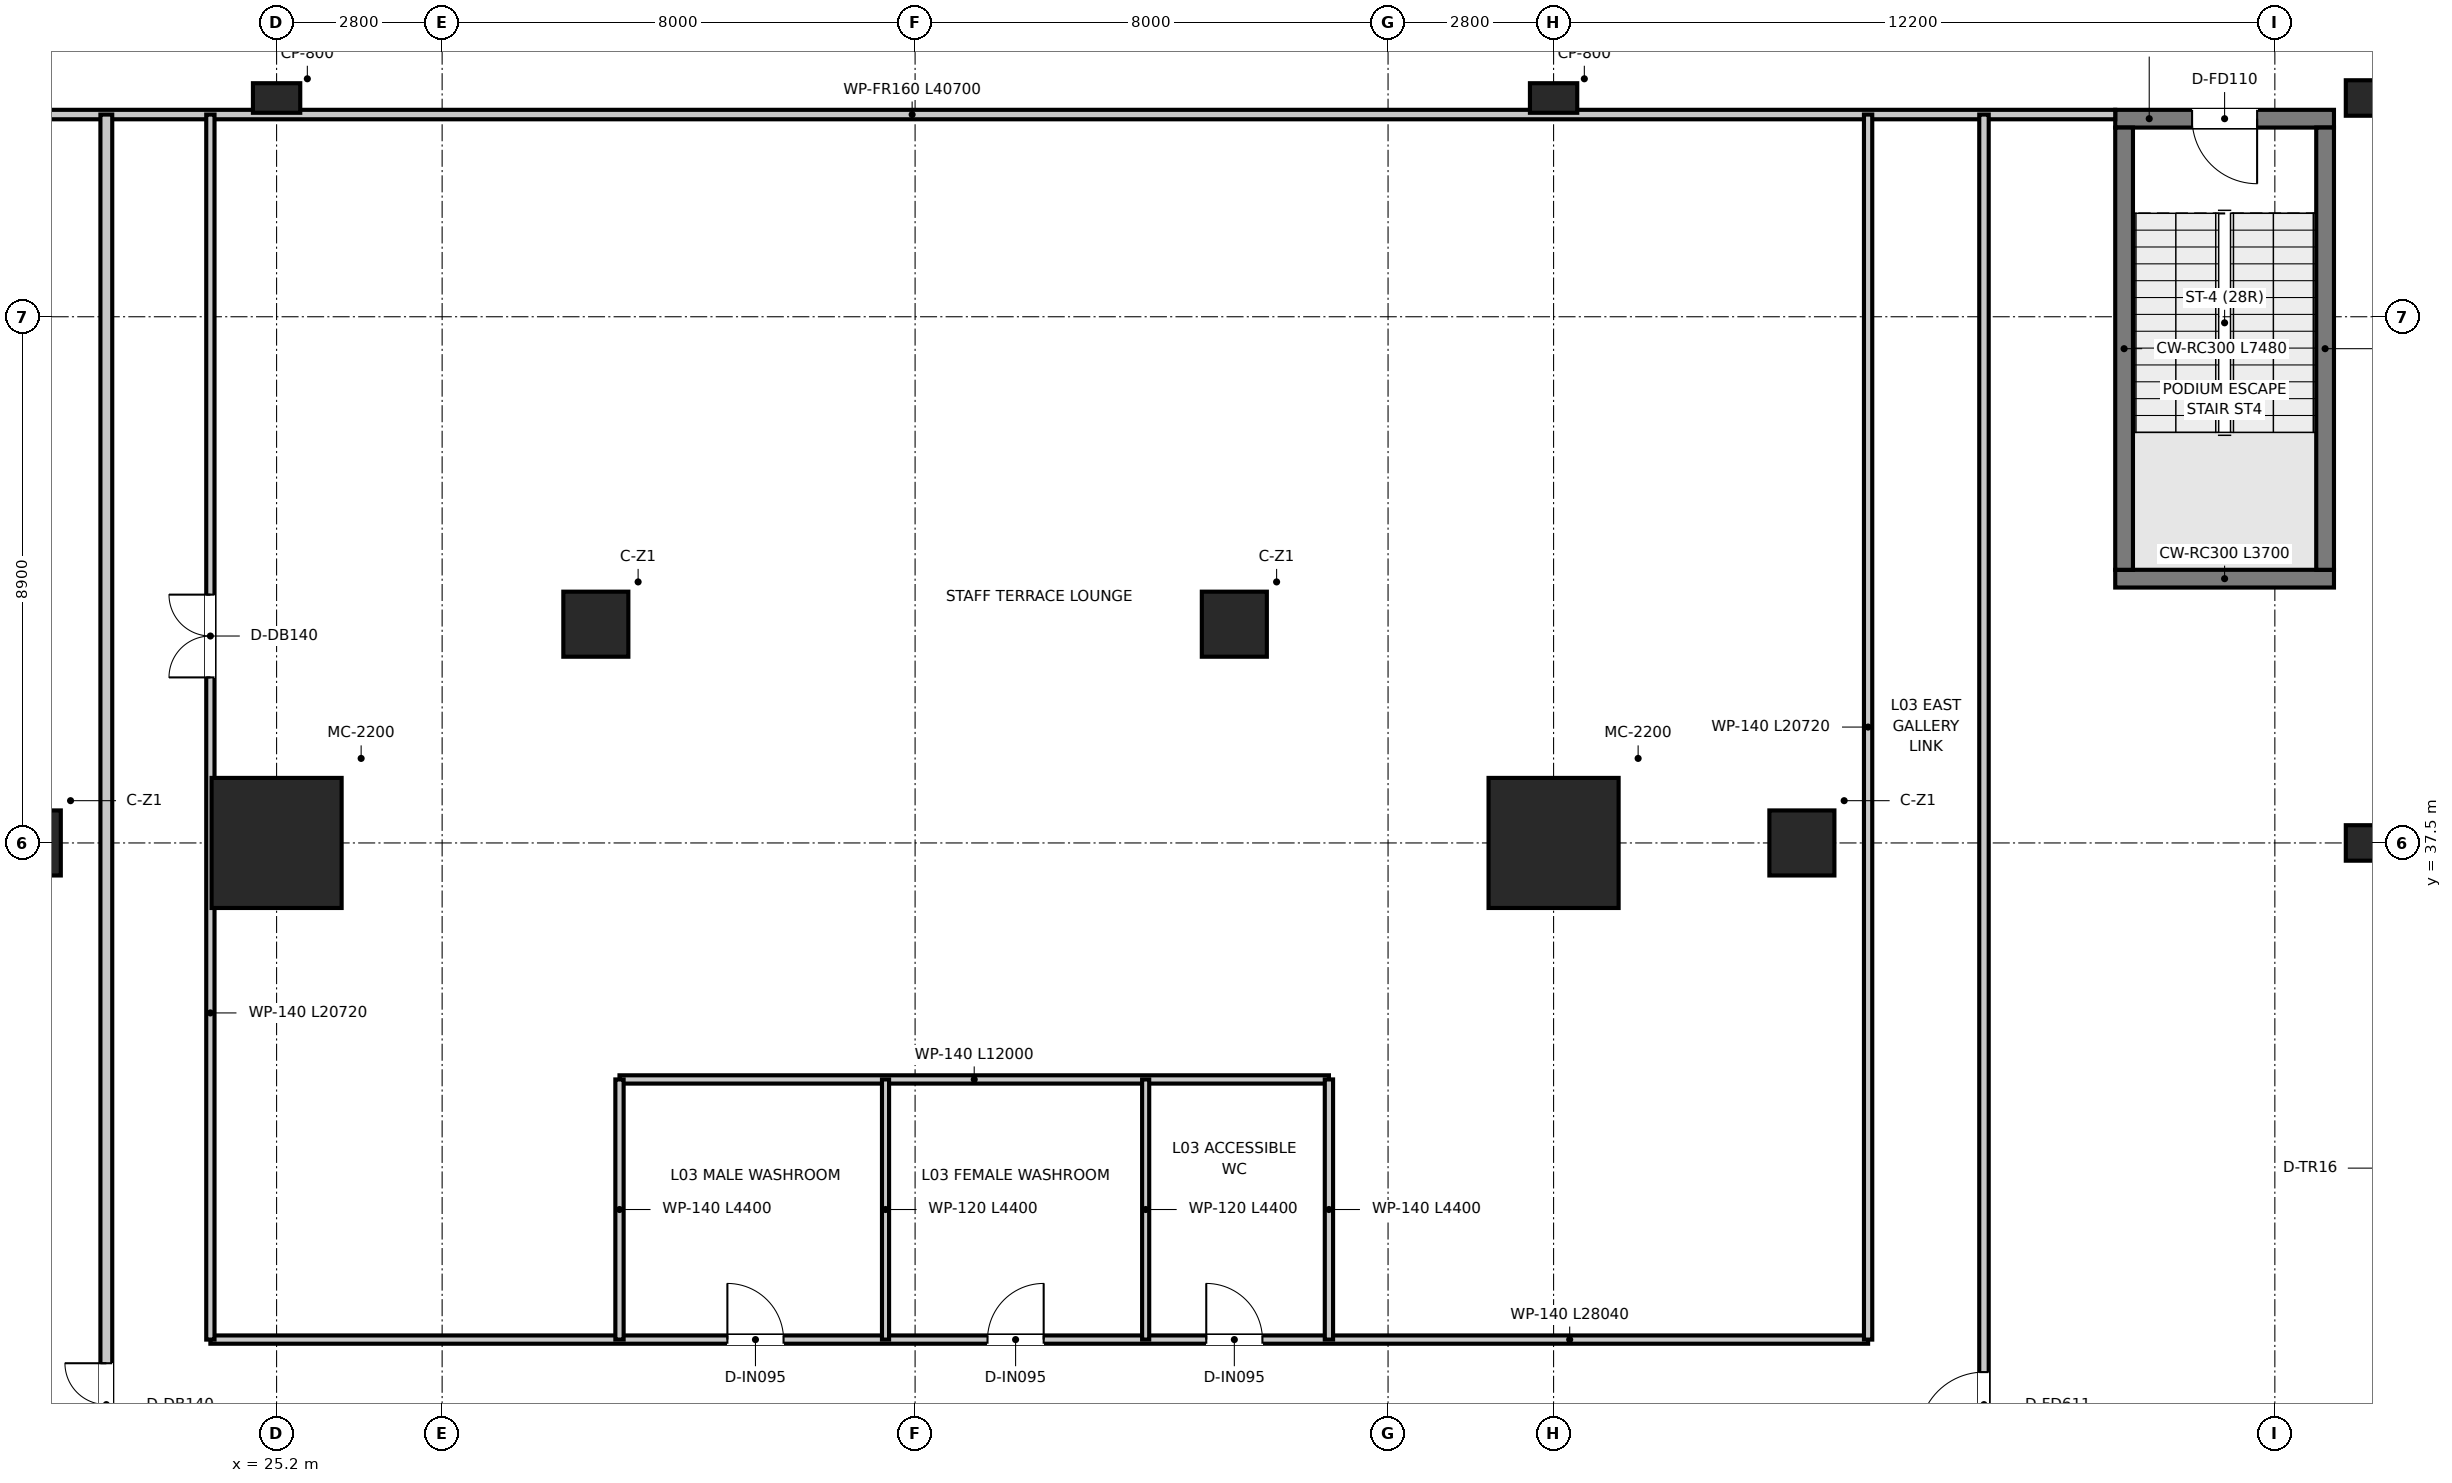
"""IFC4 building model, lengths in metres.
Left out: names, types, materials, properties, quantities, classifications, styles, units other than length and angle.
Written with IfcOpenShell. Run it as: python <this file> out.ifc"""

import sys

from ifc_helpers import new_model, si_unit, direction, frame, frame_2d, origin, origin_2d, place, context, subcontext, project, spatial, rectangle, extrude, source, transform, mapped, element, fill, save


model = new_model("IFC4")
c1 = context("Model", 3, precision=1e-05, world=origin(), true_north=direction((0.0, 1.0)))
c2 = subcontext(c1, "Body", "Model", "MODEL_VIEW")
j1 = project(units=[si_unit("LENGTHUNIT", "METRE"), si_unit("PLANEANGLEUNIT", "RADIAN")], contexts=[c1])
p1 = place(None, origin())
s1 = spatial("IfcSite", under=j1, at=p1, CompositionType="ELEMENT")
p2 = place(p1, origin())
s2 = spatial("IfcBuilding", under=s1, at=p2, CompositionType="ELEMENT")
p3 = place(p2, frame((0.0, 0.0, 15.4)))
s3 = spatial("IfcBuildingStorey", under=s2, at=p3, CompositionType="ELEMENT", Elevation=15.4)
p4 = place(p3, frame((56.3, 41.97, 0.0), z_axis=(0.0, 0.0, 1.0), x_axis=(1.0, 0.0, 0.0)))
e1 = element("IfcWall", 1, at=p4, inside=s3, PredefinedType="SHEAR", context=c2, shape_type="SweptSolid", body=[
    extrude(rectangle(XDim=3.7, YDim=0.3, at=frame_2d((1.85, 0.0))), origin(), (0.0, 0.0, 1.0), 4.6),
])
p5 = place(p3, frame((60.0, 49.75, 0.0), z_axis=(0.0, 0.0, 1.0), x_axis=(-1.0, 0.0, 0.0)))
e2 = element("IfcWall", 2, at=p5, inside=s3, PredefinedType="SHEAR", context=c2, shape_type="SweptSolid", body=[
    extrude(rectangle(XDim=3.7, YDim=0.3, at=frame_2d((1.85, 0.0))), origin(), (0.0, 0.0, 1.0), 4.6),
])
p6 = place(p5, frame((1.3, 0.0, 0.0)))
e3 = element("IfcOpeningElement", 3, at=p6, cuts=e2, PredefinedType="OPENING", context=c2, shape_type="SweptSolid", body=[
    extrude(rectangle(XDim=1.1, YDim=2.15, at=frame_2d((0.55, 1.075))), frame((0.0, 0.16, 0.0), z_axis=(0.0, -1.0, 0.0), x_axis=(1.0, 0.0, 0.0)), (0.0, 0.0, 1.0), 0.32),
])
for number, where, z_axis, x_axis in (
    (4, (56.45, 42.12, 0.0), (0.0, 0.0, 1.0), (0.0, 1.0, 0.0)),
    (5, (59.85, 42.12, 0.0), (0.0, 0.0, 1.0), (0.0, 1.0, 0.0)),
):
    element("IfcWall", number, at=place(p3, frame(where, z_axis=z_axis, x_axis=x_axis)), inside=s3, PredefinedType="SHEAR", context=c2, shape_type="SweptSolid", body=[
        extrude(rectangle(XDim=7.48, YDim=0.3, at=frame_2d((3.74, 0.0))), origin(), (0.0, 0.0, 1.0), 4.6),
    ])
m1 = source(origin(), c2, "Body", "SweptSolid", [
    extrude(rectangle(XDim=2.2, YDim=2.2, at=origin_2d()), origin(), (0.0, 0.0, 1.0), 4.6),
])
for number, where, z_axis, x_axis in (
    (6, (46.8, 37.5, 0.0), (0.0, 0.0, 1.0), (1.0, 0.0, 0.0)),
    (7, (25.2, 37.5, 0.0), (0.0, 0.0, 1.0), (1.0, 0.0, 0.0)),
):
    element("IfcColumn", number, at=place(p3, frame(where, z_axis=z_axis, x_axis=x_axis)), inside=s3, PredefinedType="USERDEFINED", context=c2, shape_type="MappedRepresentation", body=[
        mapped(m1, transform((0.0, 0.0, 0.0), x_axis=(1.0, 0.0, 0.0), y_axis=(0.0, 1.0, 0.0), z_axis=(0.0, 0.0, 1.0), scale=1.0)),
    ])
m2 = source(origin(), c2, "Body", "SweptSolid", [
    extrude(rectangle(XDim=1.1, YDim=1.1, at=origin_2d()), origin(), (0.0, 0.0, 1.0), 4.6),
])
for number, where, z_axis, x_axis in (
    (8, (21.0, 37.5, 0.0), (0.0, 0.0, 1.0), (1.0, 0.0, 0.0)),
    (9, (30.6, 41.2, 0.0), (0.0, 0.0, 1.0), (1.0, 0.0, 0.0)),
    (10, (41.4, 41.2, 0.0), (0.0, 0.0, 1.0), (1.0, 0.0, 0.0)),
    (11, (51.0, 37.5, 0.0), (0.0, 0.0, 1.0), (1.0, 0.0, 0.0)),
):
    element("IfcColumn", number, at=place(p3, frame(where, z_axis=z_axis, x_axis=x_axis)), inside=s3, PredefinedType="COLUMN", context=c2, shape_type="MappedRepresentation", body=[
        mapped(m2, transform((0.0, 0.0, 0.0), x_axis=(1.0, 0.0, 0.0), y_axis=(0.0, 1.0, 0.0), z_axis=(0.0, 0.0, 1.0), scale=1.0)),
    ])
m3 = source(origin(), c2, "Body", "SweptSolid", [
    extrude(rectangle(XDim=0.6, YDim=0.6, at=origin_2d()), origin(), (0.0, 0.0, 1.0), 4.6),
])
for number, where, z_axis, x_axis in (
    (12, (60.5, 37.5, 0.0), (0.0, 0.0, 1.0), (1.0, 0.0, 0.0)),
    (13, (60.5, 50.1, 0.0), (0.0, 0.0, 1.0), (1.0, 0.0, 0.0)),
):
    element("IfcColumn", number, at=place(p3, frame(where, z_axis=z_axis, x_axis=x_axis)), inside=s3, PredefinedType="COLUMN", context=c2, shape_type="MappedRepresentation", body=[
        mapped(m3, transform((0.0, 0.0, 0.0), x_axis=(1.0, 0.0, 0.0), y_axis=(0.0, 1.0, 0.0), z_axis=(0.0, 0.0, 1.0), scale=1.0)),
    ])
m4 = source(origin(), c2, "Body", "SweptSolid", [
    extrude(rectangle(XDim=0.8, YDim=0.5, at=origin_2d()), origin(), (0.0, 0.0, 1.0), 4.6),
])
for number, where, z_axis, x_axis in (
    (14, (25.2, 50.1, 0.0), (0.0, 0.0, 1.0), (1.0, 0.0, 0.0)),
    (15, (46.8, 50.1, 0.0), (0.0, 0.0, 1.0), (1.0, 0.0, 0.0)),
):
    element("IfcColumn", number, at=place(p3, frame(where, z_axis=z_axis, x_axis=x_axis)), inside=s3, PredefinedType="PILASTER", context=c2, shape_type="MappedRepresentation", body=[
        mapped(m4, transform((0.0, 0.0, 0.0), x_axis=(1.0, 0.0, 0.0), y_axis=(0.0, 1.0, 0.0), z_axis=(0.0, 0.0, 1.0), scale=1.0)),
    ])
p7 = place(p3, frame((24.08, 29.1, 0.0), z_axis=(0.0, 0.0, 1.0), x_axis=(1.0, 0.0, 0.0)))
e16 = element("IfcWall", 16, at=p7, inside=s3, PredefinedType="PARTITIONING", context=c2, shape_type="SweptSolid", body=[
    extrude(rectangle(XDim=28.04, YDim=0.14, at=frame_2d((14.02, 0.0))), origin(), (0.0, 0.0, 1.0), 3.45),
])
p8 = place(p7, frame((8.745, 0.0, 0.0)))
e17 = element("IfcOpeningElement", 17, at=p8, cuts=e16, PredefinedType="OPENING", context=c2, shape_type="SweptSolid", body=[
    extrude(rectangle(XDim=0.95, YDim=2.1, at=frame_2d((0.475, 1.05))), frame((0.0, 0.08, 0.0), z_axis=(0.0, -1.0, 0.0), x_axis=(1.0, 0.0, 0.0)), (0.0, 0.0, 1.0), 0.16),
])
p9 = place(p7, frame((13.145, 0.0, 0.0)))
e18 = element("IfcOpeningElement", 18, at=p9, cuts=e16, PredefinedType="OPENING", context=c2, shape_type="SweptSolid", body=[
    extrude(rectangle(XDim=0.95, YDim=2.1, at=frame_2d((0.475, 1.05))), frame((0.0, 0.08, 0.0), z_axis=(0.0, -1.0, 0.0), x_axis=(1.0, 0.0, 0.0)), (0.0, 0.0, 1.0), 0.16),
])
p10 = place(p7, frame((16.845, 0.0, 0.0)))
e19 = element("IfcOpeningElement", 19, at=p10, cuts=e16, PredefinedType="OPENING", context=c2, shape_type="SweptSolid", body=[
    extrude(rectangle(XDim=0.95, YDim=2.1, at=frame_2d((0.475, 1.05))), frame((0.0, 0.08, 0.0), z_axis=(0.0, -1.0, 0.0), x_axis=(1.0, 0.0, 0.0)), (0.0, 0.0, 1.0), 0.16),
])
p11 = place(p3, frame((15.6, 49.82, 0.0), z_axis=(0.0, 0.0, 1.0), x_axis=(1.0, 0.0, 0.0)))
e20 = element("IfcWall", 20, at=p11, inside=s3, PredefinedType="PARTITIONING", context=c2, shape_type="SweptSolid", body=[
    extrude(rectangle(XDim=40.7, YDim=0.16, at=frame_2d((20.35, 0.0))), origin(), (0.0, 0.0, 1.0), 3.56),
])
p12 = place(p3, frame((22.32, 0.605, 0.0), z_axis=(0.0, 0.0, 1.0), x_axis=(0.0, 1.0, 0.0)))
e21 = element("IfcWall", 21, at=p12, inside=s3, PredefinedType="PARTITIONING", context=c2, shape_type="SweptSolid", body=[
    extrude(rectangle(XDim=49.215, YDim=0.2, at=frame_2d((24.607, 0.0))), origin(), (0.0, 0.0, 1.0), 3.55),
])
p13 = place(p12, frame((26.695, 0.0, 0.0)))
e22 = element("IfcOpeningElement", 22, at=p13, cuts=e21, PredefinedType="OPENING", context=c2, shape_type="SweptSolid", body=[
    extrude(rectangle(XDim=1.4, YDim=2.2, at=frame_2d((0.7, 1.1))), frame((0.0, 0.11, 0.0), z_axis=(0.0, -1.0, 0.0), x_axis=(1.0, 0.0, 0.0)), (0.0, 0.0, 1.0), 0.22),
])
p14 = place(p3, frame((24.08, 29.1, 0.0), z_axis=(0.0, 0.0, 1.0), x_axis=(0.0, 1.0, 0.0)))
e23 = element("IfcWall", 23, at=p14, inside=s3, PredefinedType="PARTITIONING", context=c2, shape_type="SweptSolid", body=[
    extrude(rectangle(XDim=20.72, YDim=0.14, at=frame_2d((10.36, 0.0))), origin(), (0.0, 0.0, 1.0), 3.55),
])
p15 = place(p14, frame((11.2, 0.0, 0.0)))
e24 = element("IfcOpeningElement", 24, at=p15, cuts=e23, PredefinedType="OPENING", context=c2, shape_type="SweptSolid", body=[
    extrude(rectangle(XDim=1.4, YDim=2.2, at=frame_2d((0.7, 1.1))), frame((0.0, 0.08, 0.0), z_axis=(0.0, -1.0, 0.0), x_axis=(1.0, 0.0, 0.0)), (0.0, 0.0, 1.0), 0.16),
])
p16 = place(p3, frame((52.12, 29.1, 0.0), z_axis=(0.0, 0.0, 1.0), x_axis=(0.0, 1.0, 0.0)))
e25 = element("IfcWall", 25, at=p16, inside=s3, PredefinedType="PARTITIONING", context=c2, shape_type="SweptSolid", body=[
    extrude(rectangle(XDim=20.72, YDim=0.14, at=frame_2d((10.36, 0.0))), origin(), (0.0, 0.0, 1.0), 3.61),
])
p17 = place(p3, frame((54.08, 0.605, 0.0), z_axis=(0.0, 0.0, 1.0), x_axis=(0.0, 1.0, 0.0)))
e26 = element("IfcWall", 26, at=p17, inside=s3, PredefinedType="PARTITIONING", context=c2, shape_type="SweptSolid", body=[
    extrude(rectangle(XDim=49.215, YDim=0.16, at=frame_2d((24.607, 0.0))), origin(), (0.0, 0.0, 1.0), 3.61),
])
p18 = place(p17, frame((26.845, 0.0, 0.0)))
e27 = element("IfcOpeningElement", 27, at=p18, cuts=e26, PredefinedType="OPENING", context=c2, shape_type="SweptSolid", body=[
    extrude(rectangle(XDim=1.1, YDim=2.15, at=frame_2d((0.55, 1.075))), frame((0.0, 0.09, 0.0), z_axis=(0.0, -1.0, 0.0), x_axis=(1.0, 0.0, 0.0)), (0.0, 0.0, 1.0), 0.18),
])
p19 = place(p3, frame((31.0, 33.5, 0.0), z_axis=(0.0, 0.0, 1.0), x_axis=(1.0, 0.0, 0.0)))
e28 = element("IfcWall", 28, at=p19, inside=s3, PredefinedType="PARTITIONING", context=c2, shape_type="SweptSolid", body=[
    extrude(rectangle(XDim=12.0, YDim=0.14, at=frame_2d((6.0, 0.0))), origin(), (0.0, 0.0, 1.0), 4.25),
])
for number, where, z_axis, x_axis in (
    (29, (31.0, 29.1, 0.0), (0.0, 0.0, 1.0), (0.0, 1.0, 0.0)),
    (30, (43.0, 29.1, 0.0), (0.0, 0.0, 1.0), (0.0, 1.0, 0.0)),
):
    element("IfcWall", number, at=place(p3, frame(where, z_axis=z_axis, x_axis=x_axis)), inside=s3, PredefinedType="PARTITIONING", context=c2, shape_type="SweptSolid", body=[
        extrude(rectangle(XDim=4.4, YDim=0.14, at=frame_2d((2.2, 0.0))), origin(), (0.0, 0.0, 1.0), 3.7),
    ])
for number, where, z_axis, x_axis in (
    (31, (35.5, 29.1, 0.0), (0.0, 0.0, 1.0), (0.0, 1.0, 0.0)),
    (32, (39.9, 29.1, 0.0), (0.0, 0.0, 1.0), (0.0, 1.0, 0.0)),
):
    element("IfcWall", number, at=place(p3, frame(where, z_axis=z_axis, x_axis=x_axis)), inside=s3, PredefinedType="PARTITIONING", context=c2, shape_type="SweptSolid", body=[
        extrude(rectangle(XDim=4.4, YDim=0.12, at=frame_2d((2.2, 0.0))), origin(), (0.0, 0.0, 1.0), 3.7),
    ])
p20 = place(p6, origin())
e33 = element("IfcDoor", 33, at=p20, inside=s3, OperationType="SINGLE_SWING_LEFT", PredefinedType="DOOR", context=c2, shape_type="SweptSolid", body=[
    extrude(rectangle(XDim=1.1, YDim=2.15, at=frame_2d((0.55, 1.075))), frame((0.0, 0.025, 0.0), z_axis=(0.0, -1.0, 0.0), x_axis=(1.0, 0.0, 0.0)), (0.0, 0.0, 1.0), 0.05),
])
fill(e3, e33)
p21 = place(p8, origin())
e34 = element("IfcDoor", 34, at=p21, inside=s3, OperationType="SINGLE_SWING_LEFT", PredefinedType="DOOR", context=c2, shape_type="SweptSolid", body=[
    extrude(rectangle(XDim=0.95, YDim=2.1, at=frame_2d((0.475, 1.05))), frame((0.0, 0.025, 0.0), z_axis=(0.0, -1.0, 0.0), x_axis=(1.0, 0.0, 0.0)), (0.0, 0.0, 1.0), 0.05),
])
fill(e17, e34)
p22 = place(p9, origin())
e35 = element("IfcDoor", 35, at=p22, inside=s3, OperationType="SINGLE_SWING_RIGHT", PredefinedType="DOOR", context=c2, shape_type="SweptSolid", body=[
    extrude(rectangle(XDim=0.95, YDim=2.1, at=frame_2d((0.475, 1.05))), frame((0.0, 0.025, 0.0), z_axis=(0.0, -1.0, 0.0), x_axis=(1.0, 0.0, 0.0)), (0.0, 0.0, 1.0), 0.05),
])
fill(e18, e35)
p23 = place(p10, origin())
e36 = element("IfcDoor", 36, at=p23, inside=s3, OperationType="SINGLE_SWING_LEFT", PredefinedType="DOOR", context=c2, shape_type="SweptSolid", body=[
    extrude(rectangle(XDim=0.95, YDim=2.1, at=frame_2d((0.475, 1.05))), frame((0.0, 0.025, 0.0), z_axis=(0.0, -1.0, 0.0), x_axis=(1.0, 0.0, 0.0)), (0.0, 0.0, 1.0), 0.05),
])
fill(e19, e36)
p24 = place(p13, origin())
e37 = element("IfcDoor", 37, at=p24, inside=s3, OperationType="DOUBLE_DOOR_SINGLE_SWING", PredefinedType="DOOR", context=c2, shape_type="SweptSolid", body=[
    extrude(rectangle(XDim=1.4, YDim=2.2, at=frame_2d((0.7, 1.1))), frame((0.0, 0.025, 0.0), z_axis=(0.0, -1.0, 0.0), x_axis=(1.0, 0.0, 0.0)), (0.0, 0.0, 1.0), 0.05),
])
fill(e22, e37)
p25 = place(p15, origin())
e38 = element("IfcDoor", 38, at=p25, inside=s3, OperationType="DOUBLE_DOOR_SINGLE_SWING", PredefinedType="DOOR", context=c2, shape_type="SweptSolid", body=[
    extrude(rectangle(XDim=1.4, YDim=2.2, at=frame_2d((0.7, 1.1))), frame((0.0, 0.025, 0.0), z_axis=(0.0, -1.0, 0.0), x_axis=(1.0, 0.0, 0.0)), (0.0, 0.0, 1.0), 0.05),
])
fill(e24, e38)
p26 = place(p18, origin())
e39 = element("IfcDoor", 39, at=p26, inside=s3, OperationType="SINGLE_SWING_LEFT", PredefinedType="DOOR", context=c2, shape_type="SweptSolid", body=[
    extrude(rectangle(XDim=1.1, YDim=2.15, at=frame_2d((0.55, 1.075))), frame((0.0, 0.025, 0.0), z_axis=(0.0, -1.0, 0.0), x_axis=(1.0, 0.0, 0.0)), (0.0, 0.0, 1.0), 0.05),
])
fill(e27, e39)
save(model, sys.argv[1])
